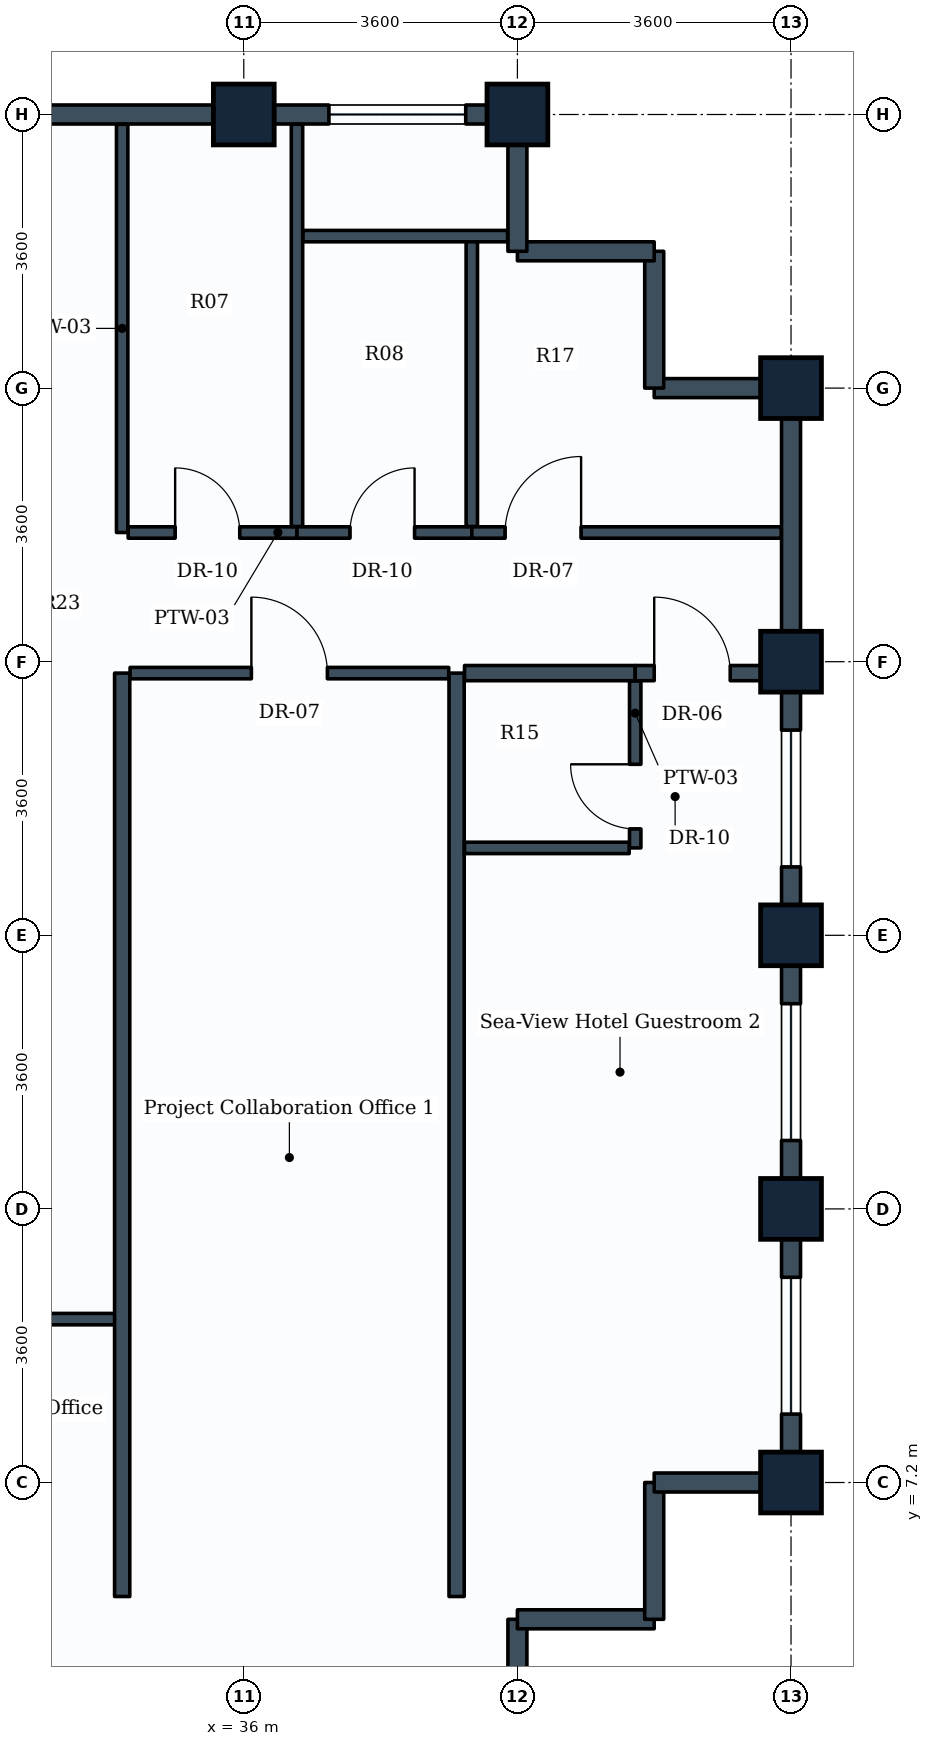
"""IFC4 building model, lengths in metres.
Left out: names, types, materials, properties, quantities, classifications, styles, units other than length and angle.
Written with IfcOpenShell. Run it as: python <this file> out.ifc"""

import sys

from ifc_helpers import new_model, si_unit, direction, frame, frame_2d, origin, origin_2d, place, context, subcontext, project, spatial, rectangle, extrude, element, fill, save


model = new_model("IFC4")
c1 = context("Model", 3, precision=1e-05, world=origin(), true_north=direction((0.0, 1.0)))
c2 = subcontext(c1, "Body", "Model", "MODEL_VIEW")
j1 = project(units=[si_unit("LENGTHUNIT", "METRE"), si_unit("PLANEANGLEUNIT", "RADIAN")], contexts=[c1])
p1 = place(None, origin())
s1 = spatial("IfcSite", under=j1, at=p1, CompositionType="ELEMENT")
p2 = place(p1, origin())
s2 = spatial("IfcBuilding", under=s1, at=p2, CompositionType="ELEMENT")
p3 = place(p2, frame((0.0, 0.0, 242.6)))
s3 = spatial("IfcBuildingStorey", under=s2, at=p3, CompositionType="ELEMENT", Elevation=242.6)
for number, where, z_axis, x_axis in (
    (1, (36.0, 25.2, 0.0), (0.0, 0.0, 1.0), (1.0, 0.0, 0.0)),
    (2, (39.6, 25.2, 0.0), (0.0, 0.0, 1.0), (1.0, 0.0, 0.0)),
    (3, (43.2, 7.2, 0.0), (0.0, 0.0, 1.0), (1.0, 0.0, 0.0)),
    (4, (43.2, 10.8, 0.0), (0.0, 0.0, 1.0), (0.0, 1.0, 0.0)),
    (5, (43.2, 14.4, 0.0), (0.0, 0.0, 1.0), (0.0, 1.0, 0.0)),
    (6, (43.2, 18.0, 0.0), (0.0, 0.0, 1.0), (0.0, 1.0, 0.0)),
    (7, (43.2, 21.6, 0.0), (0.0, 0.0, 1.0), (0.0, 1.0, 0.0)),
):
    element("IfcColumn", number, at=place(p3, frame(where, z_axis=z_axis, x_axis=x_axis)), inside=s3, PredefinedType="COLUMN", context=c2, shape_type="SweptSolid", body=[
        extrude(rectangle(XDim=0.8, YDim=0.8, at=origin_2d()), origin(), (0.0, 0.0, 1.0), 3.6),
    ])
p4 = place(p3, frame((39.6, 5.4, 0.0), z_axis=(0.0, 0.0, 1.0), x_axis=(0.0, -1.0, 0.0)))
e8 = element("IfcWall", 8, at=p4, inside=s3, PredefinedType="STANDARD", context=c2, shape_type="SweptSolid", body=[
    extrude(rectangle(XDim=1.8, YDim=0.25, at=frame_2d((0.9, 0.0))), origin(), (0.0, 0.0, 1.0), 2.83),
])
p5 = place(p3, frame((41.4, 5.4, 0.0), z_axis=(0.0, 0.0, 1.0), x_axis=(-1.0, 0.0, 0.0)))
e9 = element("IfcWall", 9, at=p5, inside=s3, PredefinedType="STANDARD", context=c2, shape_type="SweptSolid", body=[
    extrude(rectangle(XDim=1.8, YDim=0.25, at=frame_2d((0.9, 0.0))), origin(), (0.0, 0.0, 1.0), 3.335),
])
p6 = place(p3, frame((41.4, 7.2, 0.0), z_axis=(0.0, 0.0, 1.0), x_axis=(0.0, -1.0, 0.0)))
e10 = element("IfcWall", 10, at=p6, inside=s3, PredefinedType="STANDARD", context=c2, shape_type="SweptSolid", body=[
    extrude(rectangle(XDim=1.8, YDim=0.25, at=frame_2d((0.9, 0.0))), origin(), (0.0, 0.0, 1.0), 3.335),
])
p7 = place(p3, frame((43.2, 7.2, 0.0), z_axis=(0.0, 0.0, 1.0), x_axis=(-1.0, 0.0, 0.0)))
e11 = element("IfcWall", 11, at=p7, inside=s3, PredefinedType="STANDARD", context=c2, shape_type="SweptSolid", body=[
    extrude(rectangle(XDim=1.8, YDim=0.25, at=frame_2d((0.9, 0.0))), origin(), (0.0, 0.0, 1.0), 2.83),
])
p8 = place(p3, frame((43.2, 10.8, 0.0), z_axis=(0.0, 0.0, 1.0), x_axis=(0.0, -1.0, 0.0)))
e12 = element("IfcWall", 12, at=p8, inside=s3, PredefinedType="STANDARD", context=c2, shape_type="SweptSolid", body=[
    extrude(rectangle(XDim=3.6, YDim=0.25, at=frame_2d((1.8, 0.0))), origin(), (0.0, 0.0, 1.0), 2.83),
])
p9 = place(p8, frame((0.9, 0.0, 0.85)))
e13 = element("IfcOpeningElement", 13, at=p9, cuts=e12, PredefinedType="OPENING", context=c2, shape_type="SweptSolid", body=[
    extrude(rectangle(XDim=1.8, YDim=1.35, at=frame_2d((0.9, 0.675))), frame((0.0, 0.135, 0.0), z_axis=(0.0, -1.0, 0.0), x_axis=(1.0, 0.0, 0.0)), (0.0, 0.0, 1.0), 0.27),
])
p10 = place(p3, frame((43.2, 14.4, 0.0), z_axis=(0.0, 0.0, 1.0), x_axis=(0.0, -1.0, 0.0)))
e14 = element("IfcWall", 14, at=p10, inside=s3, PredefinedType="STANDARD", context=c2, shape_type="SweptSolid", body=[
    extrude(rectangle(XDim=3.6, YDim=0.25, at=frame_2d((1.8, 0.0))), origin(), (0.0, 0.0, 1.0), 2.83),
])
p11 = place(p10, frame((0.9, 0.0, 0.85)))
e15 = element("IfcOpeningElement", 15, at=p11, cuts=e14, PredefinedType="OPENING", context=c2, shape_type="SweptSolid", body=[
    extrude(rectangle(XDim=1.8, YDim=1.35, at=frame_2d((0.9, 0.675))), frame((0.0, 0.135, 0.0), z_axis=(0.0, -1.0, 0.0), x_axis=(1.0, 0.0, 0.0)), (0.0, 0.0, 1.0), 0.27),
])
p12 = place(p3, frame((43.2, 18.0, 0.0), z_axis=(0.0, 0.0, 1.0), x_axis=(0.0, -1.0, 0.0)))
e16 = element("IfcWall", 16, at=p12, inside=s3, PredefinedType="STANDARD", context=c2, shape_type="SweptSolid", body=[
    extrude(rectangle(XDim=3.6, YDim=0.25, at=frame_2d((1.8, 0.0))), origin(), (0.0, 0.0, 1.0), 2.83),
])
p13 = place(p12, frame((0.9, 0.0, 0.85)))
e17 = element("IfcOpeningElement", 17, at=p13, cuts=e16, PredefinedType="OPENING", context=c2, shape_type="SweptSolid", body=[
    extrude(rectangle(XDim=1.8, YDim=1.35, at=frame_2d((0.9, 0.675))), frame((0.0, 0.135, 0.0), z_axis=(0.0, -1.0, 0.0), x_axis=(1.0, 0.0, 0.0)), (0.0, 0.0, 1.0), 0.27),
])
p14 = place(p3, frame((43.2, 21.6, 0.0), z_axis=(0.0, 0.0, 1.0), x_axis=(0.0, -1.0, 0.0)))
e18 = element("IfcWall", 18, at=p14, inside=s3, PredefinedType="STANDARD", context=c2, shape_type="SweptSolid", body=[
    extrude(rectangle(XDim=3.6, YDim=0.25, at=frame_2d((1.8, 0.0))), origin(), (0.0, 0.0, 1.0), 2.83),
])
p15 = place(p3, frame((41.4, 21.6, 0.0), z_axis=(0.0, 0.0, 1.0), x_axis=(1.0, 0.0, 0.0)))
e19 = element("IfcWall", 19, at=p15, inside=s3, PredefinedType="STANDARD", context=c2, shape_type="SweptSolid", body=[
    extrude(rectangle(XDim=1.8, YDim=0.25, at=frame_2d((0.9, 0.0))), origin(), (0.0, 0.0, 1.0), 2.83),
])
for number, where, z_axis, x_axis in (
    (20, (41.4, 23.4, 0.0), (0.0, 0.0, 1.0), (0.0, -1.0, 0.0)),
    (21, (39.6, 23.4, 0.0), (0.0, 0.0, 1.0), (1.0, 0.0, 0.0)),
):
    element("IfcWall", number, at=place(p3, frame(where, z_axis=z_axis, x_axis=x_axis)), inside=s3, PredefinedType="STANDARD", context=c2, shape_type="SweptSolid", body=[
        extrude(rectangle(XDim=1.8, YDim=0.25, at=frame_2d((0.9, 0.0))), origin(), (0.0, 0.0, 1.0), 3.335),
    ])
p16 = place(p3, frame((39.6, 25.2, 0.0), z_axis=(0.0, 0.0, 1.0), x_axis=(0.0, -1.0, 0.0)))
e22 = element("IfcWall", 22, at=p16, inside=s3, PredefinedType="STANDARD", context=c2, shape_type="SweptSolid", body=[
    extrude(rectangle(XDim=1.8, YDim=0.25, at=frame_2d((0.9, 0.0))), origin(), (0.0, 0.0, 1.0), 2.83),
])
p17 = place(p3, frame((36.0, 25.2, 0.0), z_axis=(0.0, 0.0, 1.0), x_axis=(1.0, 0.0, 0.0)))
e23 = element("IfcWall", 23, at=p17, inside=s3, PredefinedType="STANDARD", context=c2, shape_type="SweptSolid", body=[
    extrude(rectangle(XDim=3.6, YDim=0.25, at=frame_2d((1.8, 0.0))), origin(), (0.0, 0.0, 1.0), 2.83),
])
p18 = place(p17, frame((1.12, 0.0, 0.85)))
e24 = element("IfcOpeningElement", 24, at=p18, cuts=e23, PredefinedType="OPENING", context=c2, shape_type="SweptSolid", body=[
    extrude(rectangle(XDim=1.8, YDim=1.35, at=frame_2d((0.9, 0.675))), frame((0.0, 0.135, 0.0), z_axis=(0.0, -1.0, 0.0), x_axis=(1.0, 0.0, 0.0)), (0.0, 0.0, 1.0), 0.27),
])
p19 = place(p3, frame((32.4, 25.2, 0.0), z_axis=(0.0, 0.0, 1.0), x_axis=(1.0, 0.0, 0.0)))
e25 = element("IfcWall", 25, at=p19, inside=s3, PredefinedType="STANDARD", context=c2, shape_type="SweptSolid", body=[
    extrude(rectangle(XDim=3.6, YDim=0.25, at=frame_2d((1.8, 0.0))), origin(), (0.0, 0.0, 1.0), 2.83),
])
p20 = place(p3, frame((34.4, 19.7, 0.0), z_axis=(0.0, 0.0, 1.0), x_axis=(0.0, 1.0, 0.0)))
e26 = element("IfcWall", 26, at=p20, inside=s3, PredefinedType="PARTITIONING", context=c2, shape_type="SweptSolid", body=[
    extrude(rectangle(XDim=5.371, YDim=0.15, at=frame_2d((2.686, 0.0))), origin(), (0.0, 0.0, 1.0), 2.83),
])
p21 = place(p3, frame((34.479, 19.7, 0.0), z_axis=(0.0, 0.0, 1.0), x_axis=(1.0, 0.0, 0.0)))
e27 = element("IfcWall", 27, at=p21, inside=s3, PredefinedType="PARTITIONING", context=c2, shape_type="SweptSolid", body=[
    extrude(rectangle(XDim=2.221, YDim=0.15, at=frame_2d((1.11, 0.0))), origin(), (0.0, 0.0, 1.0), 3.02),
])
p22 = place(p21, frame((0.618, 0.0, 0.0)))
e28 = element("IfcOpeningElement", 28, at=p22, cuts=e27, PredefinedType="OPENING", context=c2, shape_type="SweptSolid", body=[
    extrude(rectangle(XDim=0.85, YDim=2.1, at=frame_2d((0.425, 1.05))), frame((0.0, 0.085, 0.0), z_axis=(0.0, -1.0, 0.0), x_axis=(1.0, 0.0, 0.0)), (0.0, 0.0, 1.0), 0.17),
])
p23 = place(p3, frame((36.7, 19.779, 0.0), z_axis=(0.0, 0.0, 1.0), x_axis=(0.0, 1.0, 0.0)))
e29 = element("IfcWall", 29, at=p23, inside=s3, PredefinedType="PARTITIONING", context=c2, shape_type="SweptSolid", body=[
    extrude(rectangle(XDim=5.292, YDim=0.15, at=frame_2d((2.646, 0.0))), origin(), (0.0, 0.0, 1.0), 2.83),
])
p24 = place(p3, frame((36.7, 19.7, 0.0), z_axis=(0.0, 0.0, 1.0), x_axis=(1.0, 0.0, 0.0)))
e30 = element("IfcWall", 30, at=p24, inside=s3, PredefinedType="PARTITIONING", context=c2, shape_type="SweptSolid", body=[
    extrude(rectangle(XDim=2.3, YDim=0.15, at=frame_2d((1.15, 0.0))), origin(), (0.0, 0.0, 1.0), 3.335),
])
p25 = place(p24, frame((0.697, 0.0, 0.0)))
e31 = element("IfcOpeningElement", 31, at=p25, cuts=e30, PredefinedType="OPENING", context=c2, shape_type="SweptSolid", body=[
    extrude(rectangle(XDim=0.85, YDim=2.1, at=frame_2d((0.425, 1.05))), frame((0.0, 0.085, 0.0), z_axis=(0.0, -1.0, 0.0), x_axis=(1.0, 0.0, 0.0)), (0.0, 0.0, 1.0), 0.17),
])
p26 = place(p3, frame((39.0, 19.779, 0.0), z_axis=(0.0, 0.0, 1.0), x_axis=(0.0, 1.0, 0.0)))
e32 = element("IfcWall", 32, at=p26, inside=s3, PredefinedType="PARTITIONING", context=c2, shape_type="SweptSolid", body=[
    extrude(rectangle(XDim=3.821, YDim=0.15, at=frame_2d((1.911, 0.0))), origin(), (0.0, 0.0, 1.0), 3.335),
])
p27 = place(p3, frame((36.779, 23.6, 0.0), z_axis=(0.0, 0.0, 1.0), x_axis=(1.0, 0.0, 0.0)))
e33 = element("IfcWall", 33, at=p27, inside=s3, PredefinedType="PARTITIONING", context=c2, shape_type="SweptSolid", body=[
    extrude(rectangle(XDim=2.692, YDim=0.15, at=frame_2d((1.346, 0.0))), origin(), (0.0, 0.0, 1.0), 3.335),
])
p28 = place(p3, frame((28.879, 9.35, 0.0), z_axis=(0.0, 0.0, 1.0), x_axis=(1.0, 0.0, 0.0)))
e34 = element("IfcWall", 34, at=p28, inside=s3, PredefinedType="PARTITIONING", context=c2, shape_type="SweptSolid", body=[
    extrude(rectangle(XDim=5.521, YDim=0.15, at=frame_2d((2.76, 0.0))), origin(), (0.0, 0.0, 1.0), 3.335),
])
p29 = place(p28, frame((0.36, 0.0, 0.0)))
e35 = element("IfcOpeningElement", 35, at=p29, cuts=e34, PredefinedType="OPENING", context=c2, shape_type="SweptSolid", body=[
    extrude(rectangle(XDim=1.0, YDim=2.1, at=frame_2d((0.5, 1.05))), frame((0.0, 0.085, 0.0), z_axis=(0.0, -1.0, 0.0), x_axis=(1.0, 0.0, 0.0)), (0.0, 0.0, 1.0), 0.17),
])
for number, where, z_axis, x_axis in (
    (36, (34.4, 5.7, 0.0), (0.0, 0.0, 1.0), (0.0, 1.0, 0.0)),
    (37, (38.8, 5.7, 0.0), (0.0, 0.0, 1.0), (0.0, 1.0, 0.0)),
):
    element("IfcWall", number, at=place(p3, frame(where, z_axis=z_axis, x_axis=x_axis)), inside=s3, PredefinedType="PARTITIONING", context=c2, shape_type="SweptSolid", body=[
        extrude(rectangle(XDim=12.15, YDim=0.2, at=frame_2d((6.075, 0.0))), origin(), (0.0, 0.0, 1.0), 3.03),
    ])
p30 = place(p3, frame((34.504, 17.85, 0.0), z_axis=(0.0, 0.0, 1.0), x_axis=(1.0, 0.0, 0.0)))
e38 = element("IfcWall", 38, at=p30, inside=s3, PredefinedType="PARTITIONING", context=c2, shape_type="SweptSolid", body=[
    extrude(rectangle(XDim=4.192, YDim=0.15, at=frame_2d((2.096, 0.0))), origin(), (0.0, 0.0, 1.0), 3.02),
])
p31 = place(p30, frame((1.596, 0.0, 0.0)))
e39 = element("IfcOpeningElement", 39, at=p31, cuts=e38, PredefinedType="OPENING", context=c2, shape_type="SweptSolid", body=[
    extrude(rectangle(XDim=1.0, YDim=2.1, at=frame_2d((0.5, 1.05))), frame((0.0, 0.085, 0.0), z_axis=(0.0, -1.0, 0.0), x_axis=(1.0, 0.0, 0.0)), (0.0, 0.0, 1.0), 0.17),
])
p32 = place(p3, frame((38.904, 17.85, 0.0), z_axis=(0.0, 0.0, 1.0), x_axis=(1.0, 0.0, 0.0)))
e40 = element("IfcWall", 40, at=p32, inside=s3, PredefinedType="PARTITIONING", context=c2, shape_type="SweptSolid", body=[
    extrude(rectangle(XDim=2.246, YDim=0.2, at=frame_2d((1.123, 0.0))), origin(), (0.0, 0.0, 1.0), 3.335),
])
p33 = place(p3, frame((41.15, 17.85, 0.0), z_axis=(0.0, 0.0, 1.0), x_axis=(1.0, 0.0, 0.0)))
e41 = element("IfcWall", 41, at=p33, inside=s3, PredefinedType="PARTITIONING", context=c2, shape_type="SweptSolid", body=[
    extrude(rectangle(XDim=1.921, YDim=0.2, at=frame_2d((0.96, 0.0))), origin(), (0.0, 0.0, 1.0), 2.83),
])
p34 = place(p33, frame((0.25, 0.0, 0.0)))
e42 = element("IfcOpeningElement", 42, at=p34, cuts=e41, PredefinedType="OPENING", context=c2, shape_type="SweptSolid", body=[
    extrude(rectangle(XDim=1.0, YDim=2.1, at=frame_2d((0.5, 1.05))), frame((0.0, 0.11, 0.0), z_axis=(0.0, -1.0, 0.0), x_axis=(1.0, 0.0, 0.0)), (0.0, 0.0, 1.0), 0.22),
])
p35 = place(p3, frame((41.15, 15.55, 0.0), z_axis=(0.0, 0.0, 1.0), x_axis=(0.0, 1.0, 0.0)))
e43 = element("IfcWall", 43, at=p35, inside=s3, PredefinedType="PARTITIONING", context=c2, shape_type="SweptSolid", body=[
    extrude(rectangle(XDim=2.196, YDim=0.15, at=frame_2d((1.098, 0.0))), origin(), (0.0, 0.0, 1.0), 3.335),
])
p36 = place(p35, frame((0.25, 0.0, 0.0)))
e44 = element("IfcOpeningElement", 44, at=p36, cuts=e43, PredefinedType="OPENING", context=c2, shape_type="SweptSolid", body=[
    extrude(rectangle(XDim=0.85, YDim=2.1, at=frame_2d((0.425, 1.05))), frame((0.0, 0.085, 0.0), z_axis=(0.0, -1.0, 0.0), x_axis=(1.0, 0.0, 0.0)), (0.0, 0.0, 1.0), 0.17),
])
p37 = place(p3, frame((38.904, 15.55, 0.0), z_axis=(0.0, 0.0, 1.0), x_axis=(1.0, 0.0, 0.0)))
e45 = element("IfcWall", 45, at=p37, inside=s3, PredefinedType="PARTITIONING", context=c2, shape_type="SweptSolid", body=[
    extrude(rectangle(XDim=2.167, YDim=0.15, at=frame_2d((1.083, 0.0))), origin(), (0.0, 0.0, 1.0), 3.335),
])
p38 = place(p3, frame((39.0, 19.7, 0.0), z_axis=(0.0, 0.0, 1.0), x_axis=(1.0, 0.0, 0.0)))
e46 = element("IfcWall", 46, at=p38, inside=s3, PredefinedType="PARTITIONING", context=c2, shape_type="SweptSolid", body=[
    extrude(rectangle(XDim=4.071, YDim=0.15, at=frame_2d((2.036, 0.0))), origin(), (0.0, 0.0, 1.0), 2.83),
])
p39 = place(p38, frame((0.438, 0.0, 0.0)))
e47 = element("IfcOpeningElement", 47, at=p39, cuts=e46, PredefinedType="OPENING", context=c2, shape_type="SweptSolid", body=[
    extrude(rectangle(XDim=1.0, YDim=2.1, at=frame_2d((0.5, 1.05))), frame((0.0, 0.085, 0.0), z_axis=(0.0, -1.0, 0.0), x_axis=(1.0, 0.0, 0.0)), (0.0, 0.0, 1.0), 0.17),
])
p40 = place(p9, origin())
e48 = element("IfcWindow", 48, at=p40, inside=s3, PartitioningType="SINGLE_PANEL", PredefinedType="WINDOW", context=c2, shape_type="SweptSolid", body=[
    extrude(rectangle(XDim=1.8, YDim=1.35, at=frame_2d((0.9, 0.675))), frame((0.0, 0.03, 0.0), z_axis=(0.0, -1.0, 0.0), x_axis=(1.0, 0.0, 0.0)), (0.0, 0.0, 1.0), 0.06),
])
fill(e13, e48)
p41 = place(p11, origin())
e49 = element("IfcWindow", 49, at=p41, inside=s3, PartitioningType="SINGLE_PANEL", PredefinedType="WINDOW", context=c2, shape_type="SweptSolid", body=[
    extrude(rectangle(XDim=1.8, YDim=1.35, at=frame_2d((0.9, 0.675))), frame((0.0, 0.03, 0.0), z_axis=(0.0, -1.0, 0.0), x_axis=(1.0, 0.0, 0.0)), (0.0, 0.0, 1.0), 0.06),
])
fill(e15, e49)
p42 = place(p13, origin())
e50 = element("IfcWindow", 50, at=p42, inside=s3, PartitioningType="SINGLE_PANEL", PredefinedType="WINDOW", context=c2, shape_type="SweptSolid", body=[
    extrude(rectangle(XDim=1.8, YDim=1.35, at=frame_2d((0.9, 0.675))), frame((0.0, 0.03, 0.0), z_axis=(0.0, -1.0, 0.0), x_axis=(1.0, 0.0, 0.0)), (0.0, 0.0, 1.0), 0.06),
])
fill(e17, e50)
p43 = place(p18, origin())
e51 = element("IfcWindow", 51, at=p43, inside=s3, PartitioningType="SINGLE_PANEL", PredefinedType="WINDOW", context=c2, shape_type="SweptSolid", body=[
    extrude(rectangle(XDim=1.8, YDim=1.35, at=frame_2d((0.9, 0.675))), frame((0.0, 0.03, 0.0), z_axis=(0.0, -1.0, 0.0), x_axis=(1.0, 0.0, 0.0)), (0.0, 0.0, 1.0), 0.06),
])
fill(e24, e51)
p44 = place(p22, origin())
e52 = element("IfcDoor", 52, at=p44, inside=s3, OperationType="SINGLE_SWING_LEFT", PredefinedType="DOOR", context=c2, shape_type="SweptSolid", body=[
    extrude(rectangle(XDim=0.85, YDim=2.1, at=frame_2d((0.425, 1.05))), frame((0.0, 0.025, 0.0), z_axis=(0.0, -1.0, 0.0), x_axis=(1.0, 0.0, 0.0)), (0.0, 0.0, 1.0), 0.05),
])
fill(e28, e52)
p45 = place(p25, origin())
e53 = element("IfcDoor", 53, at=p45, inside=s3, OperationType="SINGLE_SWING_RIGHT", PredefinedType="DOOR", context=c2, shape_type="SweptSolid", body=[
    extrude(rectangle(XDim=0.85, YDim=2.1, at=frame_2d((0.425, 1.05))), frame((0.0, 0.025, 0.0), z_axis=(0.0, -1.0, 0.0), x_axis=(1.0, 0.0, 0.0)), (0.0, 0.0, 1.0), 0.05),
])
fill(e31, e53)
p46 = place(p31, origin())
e54 = element("IfcDoor", 54, at=p46, inside=s3, OperationType="SINGLE_SWING_LEFT", PredefinedType="DOOR", context=c2, shape_type="SweptSolid", body=[
    extrude(rectangle(XDim=1.0, YDim=2.1, at=frame_2d((0.5, 1.05))), frame((0.0, 0.025, 0.0), z_axis=(0.0, -1.0, 0.0), x_axis=(1.0, 0.0, 0.0)), (0.0, 0.0, 1.0), 0.05),
])
fill(e39, e54)
p47 = place(p34, origin())
e55 = element("IfcDoor", 55, at=p47, inside=s3, OperationType="SINGLE_SWING_LEFT", PredefinedType="DOOR", context=c2, shape_type="SweptSolid", body=[
    extrude(rectangle(XDim=1.0, YDim=2.1, at=frame_2d((0.5, 1.05))), frame((0.0, 0.025, 0.0), z_axis=(0.0, -1.0, 0.0), x_axis=(1.0, 0.0, 0.0)), (0.0, 0.0, 1.0), 0.05),
])
fill(e42, e55)
p48 = place(p36, origin())
e56 = element("IfcDoor", 56, at=p48, inside=s3, OperationType="SINGLE_SWING_RIGHT", PredefinedType="DOOR", context=c2, shape_type="SweptSolid", body=[
    extrude(rectangle(XDim=0.85, YDim=2.1, at=frame_2d((0.425, 1.05))), frame((0.0, 0.025, 0.0), z_axis=(0.0, -1.0, 0.0), x_axis=(1.0, 0.0, 0.0)), (0.0, 0.0, 1.0), 0.05),
])
fill(e44, e56)
p49 = place(p39, origin())
e57 = element("IfcDoor", 57, at=p49, inside=s3, OperationType="SINGLE_SWING_RIGHT", PredefinedType="DOOR", context=c2, shape_type="SweptSolid", body=[
    extrude(rectangle(XDim=1.0, YDim=2.1, at=frame_2d((0.5, 1.05))), frame((0.0, 0.025, 0.0), z_axis=(0.0, -1.0, 0.0), x_axis=(1.0, 0.0, 0.0)), (0.0, 0.0, 1.0), 0.05),
])
fill(e47, e57)
save(model, sys.argv[1])
